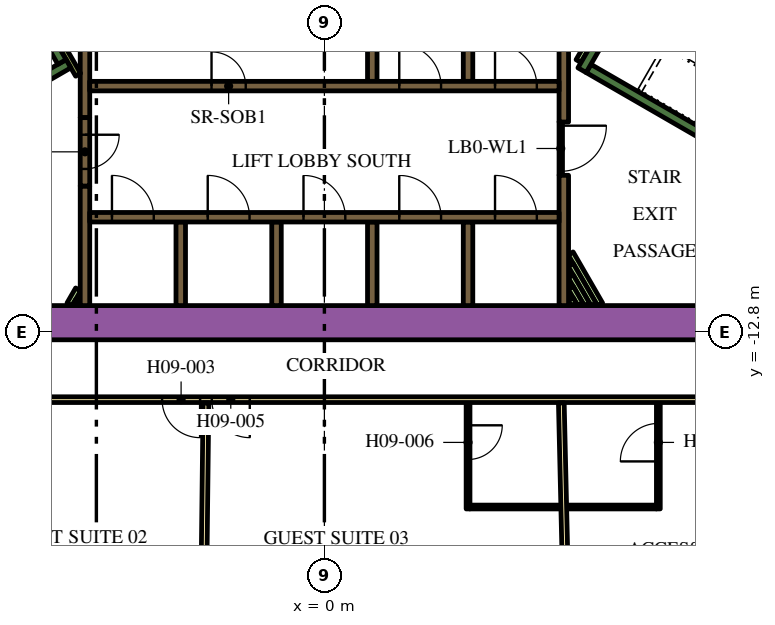
"""IFC4 building model, lengths in metres.
Left out: names, types, materials, properties, quantities, classifications, styles, units other than length and angle.
Written with IfcOpenShell. Run it as: python <this file> out.ifc"""

import sys

from ifc_helpers import new_model, si_unit, direction, frame, frame_2d, origin, place, context, subcontext, project, spatial, rectangle, extrude, element, fill, save


model = new_model("IFC4")
c1 = context("Model", 3, precision=1e-05, world=origin(), true_north=direction((0.0, 1.0)))
c2 = subcontext(c1, "Body", "Model", "MODEL_VIEW")
j1 = project(units=[si_unit("LENGTHUNIT", "METRE"), si_unit("PLANEANGLEUNIT", "RADIAN")], contexts=[c1])
p1 = place(None, origin())
s1 = spatial("IfcSite", under=j1, at=p1, CompositionType="ELEMENT")
p2 = place(p1, origin())
s2 = spatial("IfcBuilding", under=s1, at=p2, CompositionType="ELEMENT")
p3 = place(p2, frame((0.0, 0.0, 122.7)))
s3 = spatial("IfcBuildingStorey", under=s2, at=p3, CompositionType="ELEMENT", Elevation=122.7)
p4 = place(p3, frame((-12.019, -12.55, 0.0), z_axis=(0.0, 0.0, 1.0), x_axis=(1.0, 0.0, 0.0)))
e1 = element("IfcWall", 1, at=p4, inside=s3, PredefinedType="SOLIDWALL", context=c2, shape_type="SweptSolid", body=[
    extrude(rectangle(XDim=22.083, YDim=0.9, at=frame_2d((11.042, 0.0))), origin(), (0.0, 0.0, 1.0), 3.9),
])
p5 = place(p3, frame((12.84, -9.261, 0.0), z_axis=(0.0, 0.0, 1.0), x_axis=(-0.866013990052, 0.500019768644, 0.0)))
e2 = element("IfcWall", 2, at=p5, inside=s3, PredefinedType="SOLIDWALL", context=c2, shape_type="SweptSolid", body=[
    extrude(rectangle(XDim=6.8, YDim=0.25, at=frame_2d((3.4, 0.0))), origin(), (0.0, 0.0, 1.0), 3.9),
])
p6 = place(p3, frame((6.78, -5.906, 0.0), z_axis=(0.0, 0.0, 1.0), x_axis=(0.500223362819, 0.865896406789, 0.0)))
e3 = element("IfcWall", 3, at=p6, inside=s3, PredefinedType="SOLIDWALL", context=c2, shape_type="SweptSolid", body=[
    extrude(rectangle(XDim=0.675, YDim=0.25, at=frame_2d((0.337, 0.0))), origin(), (0.0, 0.0, 1.0), 3.9),
])
for number, where, z_axis, x_axis in (
    (4, (8.334, -2.964, 0.0), (0.0, 0.0, 1.0), (0.866, -0.5, 0.0)),
    (5, (-12.84, -9.261, 0.0), (0.0, 0.0, 1.0), (0.866, 0.5, 0.0)),
):
    element("IfcWall", number, at=place(p3, frame(where, z_axis=z_axis, x_axis=x_axis)), inside=s3, PredefinedType="SOLIDWALL", context=c2, shape_type="SweptSolid", body=[
        extrude(rectangle(XDim=7.05, YDim=0.25, at=frame_2d((3.525, 0.0))), origin(), (0.0, 0.0, 1.0), 3.9),
    ])
p7 = place(p3, frame((-6.905, -5.69, 0.0), z_axis=(0.0, 0.0, 1.0), x_axis=(-0.500402024738, 0.865793170242, 0.0)))
e6 = element("IfcWall", 6, at=p7, inside=s3, PredefinedType="SOLIDWALL", context=c2, shape_type="SweptSolid", body=[
    extrude(rectangle(XDim=0.425, YDim=0.25, at=frame_2d((0.212, 0.0))), origin(), (0.0, 0.0, 1.0), 3.9),
])
p8 = place(p3, frame((-3.78, -12.1, 0.0), z_axis=(0.0, 0.0, 1.0), x_axis=(0.0, 1.0, 0.0)))
e7 = element("IfcWall", 7, at=p8, inside=s3, PredefinedType="SOLIDWALL", context=c2, shape_type="SweptSolid", body=[
    extrude(rectangle(XDim=2.2, YDim=0.25, at=frame_2d((1.1, 0.0))), origin(), (0.0, 0.0, 1.0), 3.9),
])
p9 = place(p3, frame((-6.3, -12.1, 0.0), z_axis=(0.0, 0.0, 1.0), x_axis=(0.0, 1.0, 0.0)))
e8 = element("IfcWall", 8, at=p9, inside=s3, PredefinedType="SOLIDWALL", context=c2, shape_type="SweptSolid", body=[
    extrude(rectangle(XDim=3.146, YDim=0.25, at=frame_2d((1.573, 0.0))), origin(), (0.0, 0.0, 1.0), 3.9),
])
for number, where, z_axis, x_axis in (
    (9, (3.78, -4.0, 0.0), (0.0, 0.0, 1.0), (0.0, -1.0, 0.0)),
    (10, (1.26, -4.0, 0.0), (0.0, 0.0, 1.0), (0.0, -1.0, 0.0)),
):
    element("IfcWall", number, at=place(p3, frame(where, z_axis=z_axis, x_axis=x_axis)), inside=s3, PredefinedType="SOLIDWALL", context=c2, shape_type="SweptSolid", body=[
        extrude(rectangle(XDim=2.2, YDim=0.25, at=frame_2d((1.1, 0.0))), origin(), (0.0, 0.0, 1.0), 3.9),
    ])
p10 = place(p3, frame((-6.3, -3.75, 0.0), z_axis=(0.0, 0.0, 1.0), x_axis=(0.0, -1.0, 0.0)))
e11 = element("IfcWall", 11, at=p10, inside=s3, PredefinedType="SOLIDWALL", context=c2, shape_type="SweptSolid", body=[
    extrude(rectangle(XDim=3.404, YDim=0.25, at=frame_2d((1.702, 0.0))), origin(), (0.0, 0.0, 1.0), 3.9),
])
p11 = place(p3, frame((6.3, -7.27, 0.0), z_axis=(0.0, 0.0, 1.0), x_axis=(0.0, 1.0, 0.0)))
e12 = element("IfcWall", 12, at=p11, inside=s3, PredefinedType="SOLIDWALL", context=c2, shape_type="SweptSolid", body=[
    extrude(rectangle(XDim=3.586, YDim=0.25, at=frame_2d((1.793, 0.0))), origin(), (0.0, 0.0, 1.0), 3.9),
])
p12 = place(p3, frame((6.3, -12.1, 0.0), z_axis=(0.0, 0.0, 1.0), x_axis=(0.0, 1.0, 0.0)))
e13 = element("IfcWall", 13, at=p12, inside=s3, PredefinedType="SOLIDWALL", context=c2, shape_type="SweptSolid", body=[
    extrude(rectangle(XDim=3.428, YDim=0.25, at=frame_2d((1.714, 0.0))), origin(), (0.0, 0.0, 1.0), 3.9),
])
for number, where, z_axis, x_axis in (
    (14, (3.78, -12.1, 0.0), (0.0, 0.0, 1.0), (0.0, 1.0, 0.0)),
    (15, (1.26, -12.1, 0.0), (0.0, 0.0, 1.0), (0.0, 1.0, 0.0)),
    (16, (-1.26, -12.1, 0.0), (0.0, 0.0, 1.0), (0.0, 1.0, 0.0)),
):
    element("IfcWall", number, at=place(p3, frame(where, z_axis=z_axis, x_axis=x_axis)), inside=s3, PredefinedType="SOLIDWALL", context=c2, shape_type="SweptSolid", body=[
        extrude(rectangle(XDim=2.2, YDim=0.25, at=frame_2d((1.1, 0.0))), origin(), (0.0, 0.0, 1.0), 3.9),
    ])
p13 = place(p3, frame((-6.708, -12.068, 0.0), z_axis=(0.0, 0.0, 1.0), x_axis=(0.500000789788, 0.8660249478, 0.0)))
e17 = element("IfcWall", 17, at=p13, inside=s3, PredefinedType="PARTITIONING", context=c2, shape_type="SweptSolid", body=[
    extrude(rectangle(XDim=0.456, YDim=0.15, at=frame_2d((0.228, 0.0))), origin(), (0.0, 0.0, 1.0), 2.75),
])
p14 = place(p3, frame((-6.534, -12.068, 0.0), z_axis=(0.0, 0.0, 1.0), x_axis=(0.500240224089, 0.865886665912, 0.0)))
e18 = element("IfcWall", 18, at=p14, inside=s3, PredefinedType="PARTITIONING", context=c2, shape_type="SweptSolid", body=[
    extrude(rectangle(XDim=0.109, YDim=0.15, at=frame_2d((0.054, 0.0))), origin(), (0.0, 0.0, 1.0), 2.75),
])
p15 = place(p3, frame((-6.48, -6.027, 0.0), z_axis=(0.0, 0.0, 1.0), x_axis=(-0.499927229454, 0.866067413802, 0.0)))
e19 = element("IfcWall", 19, at=p15, inside=s3, PredefinedType="PARTITIONING", context=c2, shape_type="SweptSolid", body=[
    extrude(rectangle(XDim=0.929, YDim=0.15, at=frame_2d((0.464, 0.0))), origin(), (0.0, 0.0, 1.0), 3.9),
])
p16 = place(p3, frame((6.48, -10.726, 0.0), z_axis=(0.0, 0.0, 1.0), x_axis=(0.500017819788, -0.86601511528, 0.0)))
e20 = element("IfcWall", 20, at=p16, inside=s3, PredefinedType="PARTITIONING", context=c2, shape_type="SweptSolid", body=[
    extrude(rectangle(XDim=1.55, YDim=0.15, at=frame_2d((0.775, 0.0))), origin(), (0.0, 0.0, 1.0), 2.75),
])
p17 = place(p3, frame((6.48, -11.026, 0.0), z_axis=(0.0, 0.0, 1.0), x_axis=(0.49995654735, -0.86605048973, 0.0)))
e21 = element("IfcWall", 21, at=p17, inside=s3, PredefinedType="PARTITIONING", context=c2, shape_type="SweptSolid", body=[
    extrude(rectangle(XDim=1.204, YDim=0.15, at=frame_2d((0.602, 0.0))), origin(), (0.0, 0.0, 1.0), 2.75),
])
p18 = place(p3, frame((6.48, -11.326, 0.0), z_axis=(0.0, 0.0, 1.0), x_axis=(0.500059337743, -0.865991142412, 0.0)))
e22 = element("IfcWall", 22, at=p18, inside=s3, PredefinedType="PARTITIONING", context=c2, shape_type="SweptSolid", body=[
    extrude(rectangle(XDim=0.857, YDim=0.15, at=frame_2d((0.429, 0.0))), origin(), (0.0, 0.0, 1.0), 2.75),
])
p19 = place(p3, frame((6.48, -11.626, 0.0), z_axis=(0.0, 0.0, 1.0), x_axis=(0.500301480982, -0.865851273677, 0.0)))
e23 = element("IfcWall", 23, at=p19, inside=s3, PredefinedType="PARTITIONING", context=c2, shape_type="SweptSolid", body=[
    extrude(rectangle(XDim=0.511, YDim=0.15, at=frame_2d((0.255, 0.0))), origin(), (0.0, 0.0, 1.0), 2.75),
])
p20 = place(p3, frame((6.48, -11.926, 0.0), z_axis=(0.0, 0.0, 1.0), x_axis=(0.500450775723, -0.86576499183, 0.0)))
e24 = element("IfcWall", 24, at=p20, inside=s3, PredefinedType="PARTITIONING", context=c2, shape_type="SweptSolid", body=[
    extrude(rectangle(XDim=0.164, YDim=0.15, at=frame_2d((0.082, 0.0))), origin(), (0.0, 0.0, 1.0), 2.75),
])
p21 = place(p3, frame((6.945, -5.222, 0.0), z_axis=(0.0, 0.0, 1.0), x_axis=(-0.499818422106, -0.866130212453, 0.0)))
e25 = element("IfcWall", 25, at=p21, inside=s3, PredefinedType="PARTITIONING", context=c2, shape_type="SweptSolid", body=[
    extrude(rectangle(XDim=0.514, YDim=0.15, at=frame_2d((0.257, 0.0))), origin(), (0.0, 0.0, 1.0), 2.75),
])
p22 = place(p3, frame((-6.175, -9.775, 0.0), z_axis=(0.0, 0.0, 1.0), x_axis=(1.0, 0.0, 0.0)))
e26 = element("IfcWall", 26, at=p22, inside=s3, PredefinedType="SOLIDWALL", context=c2, shape_type="SweptSolid", body=[
    extrude(rectangle(XDim=12.35, YDim=0.25, at=frame_2d((6.175, 0.0))), origin(), (0.0, 0.0, 1.0), 3.9),
])
p23 = place(p22, frame((0.585, 0.0, 0.0)))
e27 = element("IfcOpeningElement", 27, at=p23, cuts=e26, PredefinedType="OPENING", context=c2, shape_type="SweptSolid", body=[
    extrude(rectangle(XDim=1.1, YDim=2.1, at=frame_2d((0.55, 1.05))), frame((0.0, 0.135, 0.0), z_axis=(0.0, -1.0, 0.0), x_axis=(1.0, 0.0, 0.0)), (0.0, 0.0, 1.0), 0.27),
])
p24 = place(p22, frame((3.105, 0.0, 0.0)))
e28 = element("IfcOpeningElement", 28, at=p24, cuts=e26, PredefinedType="OPENING", context=c2, shape_type="SweptSolid", body=[
    extrude(rectangle(XDim=1.1, YDim=2.1, at=frame_2d((0.55, 1.05))), frame((0.0, 0.135, 0.0), z_axis=(0.0, -1.0, 0.0), x_axis=(1.0, 0.0, 0.0)), (0.0, 0.0, 1.0), 0.27),
])
p25 = place(p22, frame((5.625, 0.0, 0.0)))
e29 = element("IfcOpeningElement", 29, at=p25, cuts=e26, PredefinedType="OPENING", context=c2, shape_type="SweptSolid", body=[
    extrude(rectangle(XDim=1.1, YDim=2.1, at=frame_2d((0.55, 1.05))), frame((0.0, 0.135, 0.0), z_axis=(0.0, -1.0, 0.0), x_axis=(1.0, 0.0, 0.0)), (0.0, 0.0, 1.0), 0.27),
])
p26 = place(p22, frame((8.145, 0.0, 0.0)))
e30 = element("IfcOpeningElement", 30, at=p26, cuts=e26, PredefinedType="OPENING", context=c2, shape_type="SweptSolid", body=[
    extrude(rectangle(XDim=1.1, YDim=2.1, at=frame_2d((0.55, 1.05))), frame((0.0, 0.135, 0.0), z_axis=(0.0, -1.0, 0.0), x_axis=(1.0, 0.0, 0.0)), (0.0, 0.0, 1.0), 0.27),
])
p27 = place(p22, frame((10.665, 0.0, 0.0)))
e31 = element("IfcOpeningElement", 31, at=p27, cuts=e26, PredefinedType="OPENING", context=c2, shape_type="SweptSolid", body=[
    extrude(rectangle(XDim=1.1, YDim=2.1, at=frame_2d((0.55, 1.05))), frame((0.0, 0.135, 0.0), z_axis=(0.0, -1.0, 0.0), x_axis=(1.0, 0.0, 0.0)), (0.0, 0.0, 1.0), 0.27),
])
p28 = place(p3, frame((-6.175, -6.325, 0.0), z_axis=(0.0, 0.0, 1.0), x_axis=(1.0, 0.0, 0.0)))
e32 = element("IfcWall", 32, at=p28, inside=s3, PredefinedType="SOLIDWALL", context=c2, shape_type="SweptSolid", body=[
    extrude(rectangle(XDim=12.35, YDim=0.25, at=frame_2d((6.175, 0.0))), origin(), (0.0, 0.0, 1.0), 3.9),
])
p29 = place(p28, frame((3.205, 0.0, 0.0)))
e33 = element("IfcOpeningElement", 33, at=p29, cuts=e32, PredefinedType="OPENING", context=c2, shape_type="SweptSolid", body=[
    extrude(rectangle(XDim=0.9, YDim=2.1, at=frame_2d((0.45, 1.05))), frame((0.0, 0.135, 0.0), z_axis=(0.0, -1.0, 0.0), x_axis=(1.0, 0.0, 0.0)), (0.0, 0.0, 1.0), 0.27),
])
p30 = place(p28, frame((8.145, 0.0, 0.0)))
e34 = element("IfcOpeningElement", 34, at=p30, cuts=e32, PredefinedType="OPENING", context=c2, shape_type="SweptSolid", body=[
    extrude(rectangle(XDim=1.1, YDim=2.1, at=frame_2d((0.55, 1.05))), frame((0.0, 0.135, 0.0), z_axis=(0.0, -1.0, 0.0), x_axis=(1.0, 0.0, 0.0)), (0.0, 0.0, 1.0), 0.27),
])
p31 = place(p28, frame((10.665, 0.0, 0.0)))
e35 = element("IfcOpeningElement", 35, at=p31, cuts=e32, PredefinedType="OPENING", context=c2, shape_type="SweptSolid", body=[
    extrude(rectangle(XDim=1.1, YDim=2.1, at=frame_2d((0.55, 1.05))), frame((0.0, 0.135, 0.0), z_axis=(0.0, -1.0, 0.0), x_axis=(1.0, 0.0, 0.0)), (0.0, 0.0, 1.0), 0.27),
])
p32 = place(p3, frame((-6.3, -7.154, 0.0), z_axis=(0.0, 0.0, 1.0), x_axis=(0.0, -1.0, 0.0)))
e36 = element("IfcWall", 36, at=p32, inside=s3, PredefinedType="SOLIDWALL", context=c2, shape_type="SweptSolid", body=[
    extrude(rectangle(XDim=1.8, YDim=0.25, at=frame_2d((0.9, 0.0))), origin(), (0.0, 0.0, 1.0), 3.9),
])
p33 = place(p32, frame((0.45, 0.0, 0.0)))
e37 = element("IfcOpeningElement", 37, at=p33, cuts=e36, PredefinedType="OPENING", context=c2, shape_type="SweptSolid", body=[
    extrude(rectangle(XDim=0.9, YDim=2.1, at=frame_2d((0.45, 1.05))), frame((0.0, 0.135, 0.0), z_axis=(0.0, -1.0, 0.0), x_axis=(1.0, 0.0, 0.0)), (0.0, 0.0, 1.0), 0.27),
])
p34 = place(p3, frame((6.22, -7.266, 0.0), z_axis=(0.0, 0.0, 1.0), x_axis=(0.0, -1.0, 0.0)))
e38 = element("IfcWall", 38, at=p34, inside=s3, PredefinedType="PARTITIONING", context=c2, shape_type="SweptSolid", body=[
    extrude(rectangle(XDim=1.4, YDim=0.09, at=frame_2d((0.7, 0.0))), origin(), (0.0, 0.0, 1.0), 2.75),
])
p35 = place(p34, frame((0.1, 0.0, 0.0)))
e39 = element("IfcOpeningElement", 39, at=p35, cuts=e38, PredefinedType="OPENING", context=c2, shape_type="SweptSolid", body=[
    extrude(rectangle(XDim=1.2, YDim=2.1, at=frame_2d((0.6, 1.05))), frame((0.0, 0.055, 0.0), z_axis=(0.0, -1.0, 0.0), x_axis=(1.0, 0.0, 0.0)), (0.0, 0.0, 1.0), 0.11),
])
p36 = place(p3, frame((12.918, -14.575, 0.0), z_axis=(0.0, 0.0, 1.0), x_axis=(-1.0, 0.0, 0.0)))
e40 = element("IfcWall", 40, at=p36, inside=s3, PredefinedType="PARTITIONING", context=c2, shape_type="SweptSolid", body=[
    extrude(rectangle(XDim=25.766, YDim=0.15, at=frame_2d((12.883, 0.0))), origin(), (0.0, 0.0, 1.0), 2.75),
])
p37 = place(p36, frame((16.189, 0.0, 0.0)))
e41 = element("IfcOpeningElement", 41, at=p37, cuts=e40, PredefinedType="OPENING", context=c2, shape_type="SweptSolid", body=[
    extrude(rectangle(XDim=1.0, YDim=2.1, at=frame_2d((0.5, 1.05))), frame((0.0, 0.085, 0.0), z_axis=(0.0, -1.0, 0.0), x_axis=(1.0, 0.0, 0.0)), (0.0, 0.0, 1.0), 0.17),
])
p38 = place(p36, frame((14.882, 0.0, 0.0)))
e42 = element("IfcOpeningElement", 42, at=p38, cuts=e40, PredefinedType="OPENING", context=c2, shape_type="SweptSolid", body=[
    extrude(rectangle(XDim=1.0, YDim=2.1, at=frame_2d((0.5, 1.05))), frame((0.0, 0.085, 0.0), z_axis=(0.0, -1.0, 0.0), x_axis=(1.0, 0.0, 0.0)), (0.0, 0.0, 1.0), 0.17),
])
p39 = place(p36, frame((0.596, 0.0, 0.0)))
e43 = element("IfcOpeningElement", 43, at=p39, cuts=e40, PredefinedType="OPENING", context=c2, shape_type="SweptSolid", body=[
    extrude(rectangle(XDim=1.1, YDim=2.1, at=frame_2d((0.55, 1.05))), frame((0.0, 0.085, 0.0), z_axis=(0.0, -1.0, 0.0), x_axis=(1.0, 0.0, 0.0)), (0.0, 0.0, 1.0), 0.17),
])
p40 = place(p3, frame((-3.202, -21.916, 0.0), z_axis=(0.0, 0.0, 1.0), x_axis=(0.011707696285, 0.999931462575, 0.0)))
e44 = element("IfcWall", 44, at=p40, inside=s3, PredefinedType="PARTITIONING", context=c2, shape_type="SweptSolid", body=[
    extrude(rectangle(XDim=7.257, YDim=0.15, at=frame_2d((3.628, 0.0))), origin(), (0.0, 0.0, 1.0), 2.75),
])
p41 = place(p3, frame((6.389, -21.269, 0.0), z_axis=(0.0, 0.0, 1.0), x_axis=(-0.023377429176, 0.999726710559, 0.0)))
e45 = element("IfcWall", 45, at=p41, inside=s3, PredefinedType="PARTITIONING", context=c2, shape_type="SweptSolid", body=[
    extrude(rectangle(XDim=6.611, YDim=0.15, at=frame_2d((3.305, 0.0))), origin(), (0.0, 0.0, 1.0), 2.75),
])
p42 = place(p3, frame((3.78, -14.65, 0.0), z_axis=(0.0, 0.0, 1.0), x_axis=(0.0, -1.0, 0.0)))
e46 = element("IfcWall", 46, at=p42, inside=s3, PredefinedType="PARTITIONING", context=c2, shape_type="SweptSolid", body=[
    extrude(rectangle(XDim=2.8, YDim=0.1, at=frame_2d((1.4, 0.0))), origin(), (0.0, 0.0, 1.0), 2.75),
])
p43 = place(p42, frame((0.6, 0.0, 0.0)))
e47 = element("IfcOpeningElement", 47, at=p43, cuts=e46, PredefinedType="OPENING", context=c2, shape_type="SweptSolid", body=[
    extrude(rectangle(XDim=0.9, YDim=2.1, at=frame_2d((0.45, 1.05))), frame((0.0, 0.06, 0.0), z_axis=(0.0, -1.0, 0.0), x_axis=(1.0, 0.0, 0.0)), (0.0, 0.0, 1.0), 0.12),
])
p44 = place(p3, frame((3.83, -17.4, 0.0), z_axis=(0.0, 0.0, 1.0), x_axis=(1.0, 0.0, 0.0)))
e48 = element("IfcWall", 48, at=p44, inside=s3, PredefinedType="PARTITIONING", context=c2, shape_type="SweptSolid", body=[
    extrude(rectangle(XDim=2.39, YDim=0.1, at=frame_2d((1.195, 0.0))), origin(), (0.0, 0.0, 1.0), 2.75),
])
p45 = place(p3, frame((8.788, -17.45, 0.0), z_axis=(0.0, 0.0, 1.0), x_axis=(0.0, 1.0, 0.0)))
e49 = element("IfcWall", 49, at=p45, inside=s3, PredefinedType="PARTITIONING", context=c2, shape_type="SweptSolid", body=[
    extrude(rectangle(XDim=2.8, YDim=0.1, at=frame_2d((1.4, 0.0))), origin(), (0.0, 0.0, 1.0), 2.75),
])
p46 = place(p45, frame((1.25, 0.0, 0.0)))
e50 = element("IfcOpeningElement", 50, at=p46, cuts=e49, PredefinedType="OPENING", context=c2, shape_type="SweptSolid", body=[
    extrude(rectangle(XDim=1.0, YDim=2.1, at=frame_2d((0.5, 1.05))), frame((0.0, 0.06, 0.0), z_axis=(0.0, -1.0, 0.0), x_axis=(1.0, 0.0, 0.0)), (0.0, 0.0, 1.0), 0.12),
])
p47 = place(p3, frame((8.738, -17.4, 0.0), z_axis=(0.0, 0.0, 1.0), x_axis=(-1.0, 0.0, 0.0)))
e51 = element("IfcWall", 51, at=p47, inside=s3, PredefinedType="PARTITIONING", context=c2, shape_type="SweptSolid", body=[
    extrude(rectangle(XDim=2.36, YDim=0.1, at=frame_2d((1.18, 0.0))), origin(), (0.0, 0.0, 1.0), 2.75),
])
p48 = place(p23, origin())
e52 = element("IfcDoor", 52, at=p48, inside=s3, OperationType="DOUBLE_DOOR_SLIDING", PredefinedType="DOOR", context=c2, shape_type="SweptSolid", body=[
    extrude(rectangle(XDim=1.1, YDim=2.1, at=frame_2d((0.55, 1.05))), frame((0.0, 0.025, 0.0), z_axis=(0.0, -1.0, 0.0), x_axis=(1.0, 0.0, 0.0)), (0.0, 0.0, 1.0), 0.05),
])
fill(e27, e52)
p49 = place(p24, origin())
e53 = element("IfcDoor", 53, at=p49, inside=s3, OperationType="DOUBLE_DOOR_SLIDING", PredefinedType="DOOR", context=c2, shape_type="SweptSolid", body=[
    extrude(rectangle(XDim=1.1, YDim=2.1, at=frame_2d((0.55, 1.05))), frame((0.0, 0.025, 0.0), z_axis=(0.0, -1.0, 0.0), x_axis=(1.0, 0.0, 0.0)), (0.0, 0.0, 1.0), 0.05),
])
fill(e28, e53)
p50 = place(p25, origin())
e54 = element("IfcDoor", 54, at=p50, inside=s3, OperationType="DOUBLE_DOOR_SLIDING", PredefinedType="DOOR", context=c2, shape_type="SweptSolid", body=[
    extrude(rectangle(XDim=1.1, YDim=2.1, at=frame_2d((0.55, 1.05))), frame((0.0, 0.025, 0.0), z_axis=(0.0, -1.0, 0.0), x_axis=(1.0, 0.0, 0.0)), (0.0, 0.0, 1.0), 0.05),
])
fill(e29, e54)
p51 = place(p26, origin())
e55 = element("IfcDoor", 55, at=p51, inside=s3, OperationType="DOUBLE_DOOR_SLIDING", PredefinedType="DOOR", context=c2, shape_type="SweptSolid", body=[
    extrude(rectangle(XDim=1.1, YDim=2.1, at=frame_2d((0.55, 1.05))), frame((0.0, 0.025, 0.0), z_axis=(0.0, -1.0, 0.0), x_axis=(1.0, 0.0, 0.0)), (0.0, 0.0, 1.0), 0.05),
])
fill(e30, e55)
p52 = place(p27, origin())
e56 = element("IfcDoor", 56, at=p52, inside=s3, OperationType="DOUBLE_DOOR_SLIDING", PredefinedType="DOOR", context=c2, shape_type="SweptSolid", body=[
    extrude(rectangle(XDim=1.1, YDim=2.1, at=frame_2d((0.55, 1.05))), frame((0.0, 0.025, 0.0), z_axis=(0.0, -1.0, 0.0), x_axis=(1.0, 0.0, 0.0)), (0.0, 0.0, 1.0), 0.05),
])
fill(e31, e56)
p53 = place(p29, origin())
e57 = element("IfcDoor", 57, at=p53, inside=s3, OperationType="SINGLE_SWING_LEFT", PredefinedType="DOOR", context=c2, shape_type="SweptSolid", body=[
    extrude(rectangle(XDim=0.9, YDim=2.1, at=frame_2d((0.45, 1.05))), frame((0.0, 0.025, 0.0), z_axis=(0.0, -1.0, 0.0), x_axis=(1.0, 0.0, 0.0)), (0.0, 0.0, 1.0), 0.05),
])
fill(e33, e57)
p54 = place(p30, origin())
e58 = element("IfcDoor", 58, at=p54, inside=s3, OperationType="DOUBLE_DOOR_SLIDING", PredefinedType="DOOR", context=c2, shape_type="SweptSolid", body=[
    extrude(rectangle(XDim=1.1, YDim=2.1, at=frame_2d((0.55, 1.05))), frame((0.0, 0.025, 0.0), z_axis=(0.0, -1.0, 0.0), x_axis=(1.0, 0.0, 0.0)), (0.0, 0.0, 1.0), 0.05),
])
fill(e34, e58)
p55 = place(p31, origin())
e59 = element("IfcDoor", 59, at=p55, inside=s3, OperationType="DOUBLE_DOOR_SLIDING", PredefinedType="DOOR", context=c2, shape_type="SweptSolid", body=[
    extrude(rectangle(XDim=1.1, YDim=2.1, at=frame_2d((0.55, 1.05))), frame((0.0, 0.025, 0.0), z_axis=(0.0, -1.0, 0.0), x_axis=(1.0, 0.0, 0.0)), (0.0, 0.0, 1.0), 0.05),
])
fill(e35, e59)
p56 = place(p33, origin())
e60 = element("IfcDoor", 60, at=p56, inside=s3, OperationType="SINGLE_SWING_LEFT", PredefinedType="DOOR", context=c2, shape_type="SweptSolid", body=[
    extrude(rectangle(XDim=0.9, YDim=2.1, at=frame_2d((0.45, 1.05))), frame((0.0, 0.025, 0.0), z_axis=(0.0, -1.0, 0.0), x_axis=(1.0, 0.0, 0.0)), (0.0, 0.0, 1.0), 0.05),
])
fill(e37, e60)
p57 = place(p35, origin())
e61 = element("IfcDoor", 61, at=p57, inside=s3, OperationType="SINGLE_SWING_LEFT", PredefinedType="DOOR", context=c2, shape_type="SweptSolid", body=[
    extrude(rectangle(XDim=1.2, YDim=2.1, at=frame_2d((0.6, 1.05))), frame((0.0, 0.025, 0.0), z_axis=(0.0, -1.0, 0.0), x_axis=(1.0, 0.0, 0.0)), (0.0, 0.0, 1.0), 0.05),
])
fill(e39, e61)
p58 = place(p37, origin())
e62 = element("IfcDoor", 62, at=p58, inside=s3, OperationType="SINGLE_SWING_LEFT", PredefinedType="DOOR", context=c2, shape_type="SweptSolid", body=[
    extrude(rectangle(XDim=1.0, YDim=2.1, at=frame_2d((0.5, 1.05))), frame((0.0, 0.025, 0.0), z_axis=(0.0, -1.0, 0.0), x_axis=(1.0, 0.0, 0.0)), (0.0, 0.0, 1.0), 0.05),
])
fill(e41, e62)
p59 = place(p38, origin())
e63 = element("IfcDoor", 63, at=p59, inside=s3, OperationType="SINGLE_SWING_RIGHT", PredefinedType="DOOR", context=c2, shape_type="SweptSolid", body=[
    extrude(rectangle(XDim=1.0, YDim=2.1, at=frame_2d((0.5, 1.05))), frame((0.0, 0.025, 0.0), z_axis=(0.0, -1.0, 0.0), x_axis=(1.0, 0.0, 0.0)), (0.0, 0.0, 1.0), 0.05),
])
fill(e42, e63)
p60 = place(p43, origin())
e64 = element("IfcDoor", 64, at=p60, inside=s3, OperationType="SINGLE_SWING_RIGHT", PredefinedType="DOOR", context=c2, shape_type="SweptSolid", body=[
    extrude(rectangle(XDim=0.9, YDim=2.1, at=frame_2d((0.45, 1.05))), frame((0.0, 0.025, 0.0), z_axis=(0.0, -1.0, 0.0), x_axis=(1.0, 0.0, 0.0)), (0.0, 0.0, 1.0), 0.05),
])
fill(e47, e64)
p61 = place(p46, origin())
e65 = element("IfcDoor", 65, at=p61, inside=s3, OperationType="SINGLE_SWING_LEFT", PredefinedType="DOOR", context=c2, shape_type="SweptSolid", body=[
    extrude(rectangle(XDim=1.0, YDim=2.1, at=frame_2d((0.5, 1.05))), frame((0.0, 0.025, 0.0), z_axis=(0.0, -1.0, 0.0), x_axis=(1.0, 0.0, 0.0)), (0.0, 0.0, 1.0), 0.05),
])
fill(e50, e65)
save(model, sys.argv[1])
